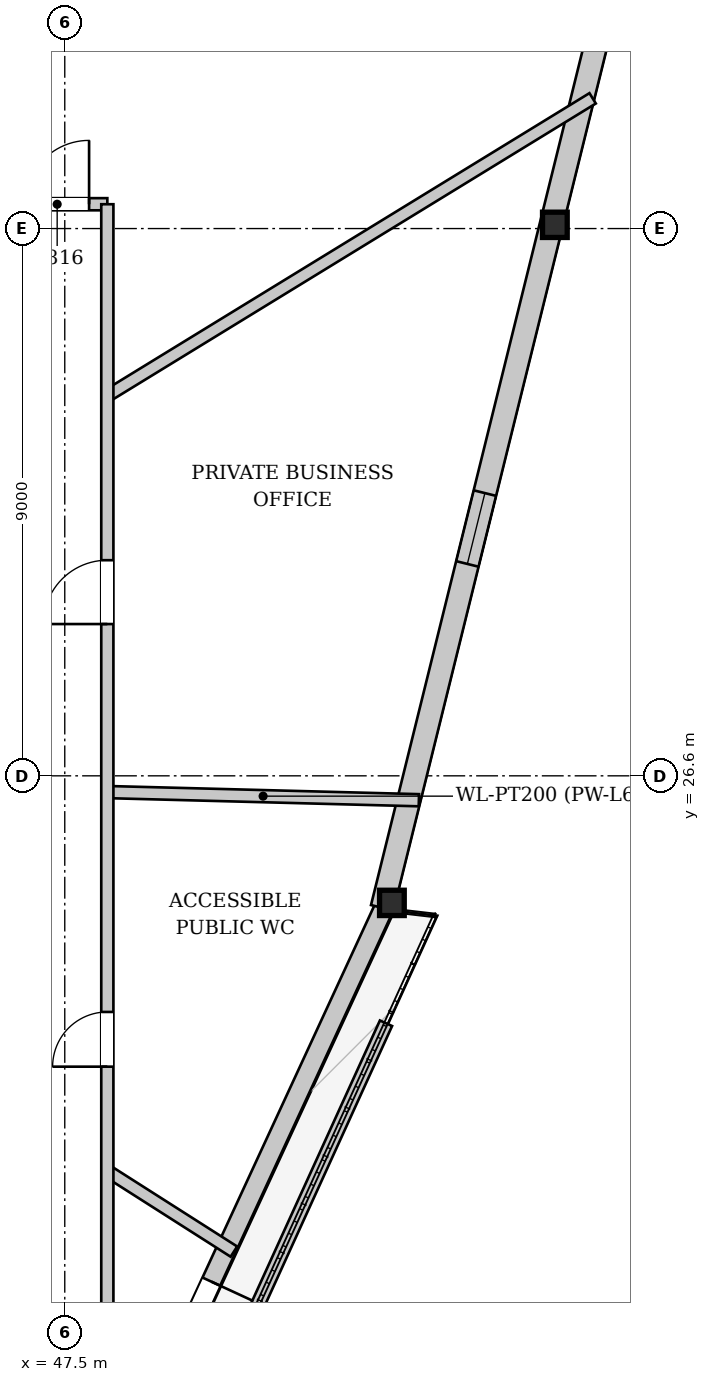
"""IFC4 building model, lengths in metres.
Left out: names, types, materials, properties, quantities, classifications, styles, units other than length and angle.
Written with IfcOpenShell. Run it as: python <this file> out.ifc"""

import sys

from ifc_helpers import new_model, si_unit, direction, frame, frame_2d, origin, origin_2d, place, context, subcontext, project, spatial, rectangle, i_section, extrude, source, transform, mapped, element, fill, save


model = new_model("IFC4")
c1 = context("Model", 3, precision=1e-05, world=origin(), true_north=direction((0.0, 1.0)))
c2 = subcontext(c1, "Body", "Model", "MODEL_VIEW")
j1 = project(units=[si_unit("LENGTHUNIT", "METRE"), si_unit("PLANEANGLEUNIT", "RADIAN")], contexts=[c1])
p1 = place(None, origin())
s1 = spatial("IfcSite", under=j1, at=p1, CompositionType="ELEMENT")
p2 = place(p1, origin())
s2 = spatial("IfcBuilding", under=s1, at=p2, CompositionType="ELEMENT")
p3 = place(p2, frame((0.0, 0.0, 227.35)))
s3 = spatial("IfcBuildingStorey", under=s2, at=p3, CompositionType="ELEMENT", Elevation=227.35)
m1 = source(origin(), c2, "Body", "SweptSolid", [
    extrude(i_section(OverallWidth=0.406, OverallDepth=0.416, WebThickness=0.027, FlangeThickness=0.042, at=origin_2d()), origin(), (0.0, 0.0, 1.0), 3.395),
])
p4 = place(p3, frame((52.905, 24.384, 0.0), z_axis=(-0.014886205973, 0.074790600059, 0.997088144055), x_axis=(-0.980761610282, -0.195209282047, 0.0)))
e1 = element("IfcColumn", 1, at=p4, inside=s3, PredefinedType="COLUMN", context=c2, shape_type="MappedRepresentation", body=[
    mapped(m1, transform((0.0, 0.0, 0.0), x_axis=(1.0, 0.0, 0.0), y_axis=(0.0, 1.0, 0.0), z_axis=(0.0, 0.0, 1.0), scale=1.0)),
])
m2 = source(origin(), c2, "Body", "SweptSolid", [
    extrude(i_section(OverallWidth=0.406, OverallDepth=0.416, WebThickness=0.027, FlangeThickness=0.042, at=origin_2d()), origin(), (0.0, 0.0, 1.0), 3.402),
])
p5 = place(p3, frame((55.663, 35.523, 0.0), z_axis=(-0.060488685139, 0.081082104635, 0.994870248464), x_axis=(-0.80152951898, -0.597955207522, 0.0)))
e2 = element("IfcColumn", 2, at=p5, inside=s3, PredefinedType="COLUMN", context=c2, shape_type="MappedRepresentation", body=[
    mapped(m2, transform((0.0, 0.0, 0.0), x_axis=(1.0, 0.0, 0.0), y_axis=(0.0, 1.0, 0.0), z_axis=(0.0, 0.0, 1.0), scale=1.0)),
])
p6 = place(p3, frame((52.76, 24.451, 0.0), z_axis=(0.0, 0.0, 1.0), x_axis=(-0.419378553641, -0.907811449997, 0.0)))
e3 = element("IfcWall", 3, at=p6, inside=s3, PredefinedType="SOLIDWALL", context=c2, shape_type="SweptSolid", body=[
    extrude(rectangle(XDim=22.952, YDim=0.32, at=frame_2d((11.476, 0.0))), origin(), (0.0, 0.0, 1.0), 2.822),
])
p7 = place(p6, frame((6.795, 0.0, 0.0)))
e4 = element("IfcOpeningElement", 4, at=p7, cuts=e3, PredefinedType="OPENING", context=c2, shape_type="SweptSolid", body=[
    extrude(rectangle(XDim=1.5, YDim=2.3, at=frame_2d((0.75, 1.15))), frame((0.0, 0.17, 0.0), z_axis=(0.0, -1.0, 0.0), x_axis=(1.0, 0.0, 0.0)), (0.0, 0.0, 1.0), 0.34),
])
p8 = place(p6, frame((17.285, 0.0, 0.352)))
e5 = element("IfcOpeningElement", 5, at=p8, cuts=e3, PredefinedType="OPENING", context=c2, shape_type="SweptSolid", body=[
    extrude(rectangle(XDim=2.6, YDim=2.35, at=frame_2d((1.3, 1.175))), frame((0.0, 0.17, 0.0), z_axis=(0.0, -1.0, 0.0), x_axis=(1.0, 0.0, 0.0)), (0.0, 0.0, 1.0), 0.34),
])
p9 = place(p3, frame((58.237, 46.709, 0.0), z_axis=(0.0, 0.0, 1.0), x_axis=(-0.240317528697, -0.9706943316, 0.0)))
e6 = element("IfcWall", 6, at=p9, inside=s3, PredefinedType="SOLIDWALL", context=c2, shape_type="SweptSolid", body=[
    extrude(rectangle(XDim=22.952, YDim=0.38, at=frame_2d((11.476, 0.0))), origin(), (0.0, 0.0, 1.0), 2.822),
])
p10 = place(p9, frame((5.827, 0.0, 0.65)))
e7 = element("IfcOpeningElement", 7, at=p10, cuts=e6, PredefinedType="OPENING", context=c2, shape_type="SweptSolid", body=[
    extrude(rectangle(XDim=1.2, YDim=1.5, at=frame_2d((0.6, 0.75))), frame((0.0, 0.2, 0.0), z_axis=(0.0, -1.0, 0.0), x_axis=(1.0, 0.0, 0.0)), (0.0, 0.0, 1.0), 0.4),
])
p11 = place(p9, frame((15.926, 0.0, 0.65)))
e8 = element("IfcOpeningElement", 8, at=p11, cuts=e6, PredefinedType="OPENING", context=c2, shape_type="SweptSolid", body=[
    extrude(rectangle(XDim=1.2, YDim=1.5, at=frame_2d((0.6, 0.75))), frame((0.0, 0.2, 0.0), z_axis=(0.0, -1.0, 0.0), x_axis=(1.0, 0.0, 0.0)), (0.0, 0.0, 1.0), 0.4),
])
p12 = place(p3, frame((44.308, 3.919, 0.0), z_axis=(0.0, 0.0, 1.0), x_axis=(0.41441444949, 0.910088272671, 0.0)))
e9 = element("IfcWall", 9, at=p12, inside=s3, PredefinedType="PARAPET", context=c2, shape_type="SweptSolid", body=[
    extrude(rectangle(XDim=20.451, YDim=0.22, at=frame_2d((10.226, 0.0))), origin(), (0.0, 0.0, 1.0), 0.3),
])
p13 = place(p3, frame((48.2, 26.333, 0.0), z_axis=(0.0, 0.0, 1.0), x_axis=(0.999656781233, -0.026197704754, 0.0)))
e10 = element("IfcWall", 10, at=p13, inside=s3, PredefinedType="PARTITIONING", context=c2, shape_type="SweptSolid", body=[
    extrude(rectangle(XDim=5.125, YDim=0.2, at=frame_2d((2.563, 0.0))), origin(), (0.0, 0.0, 1.0), 3.33),
])
p14 = place(p3, frame((48.2, 32.851, 0.0), z_axis=(0.0, 0.0, 1.0), x_axis=(0.852636485322, 0.522504568303, 0.0)))
e11 = element("IfcWall", 11, at=p14, inside=s3, PredefinedType="PARTITIONING", context=c2, shape_type="SweptSolid", body=[
    extrude(rectangle(XDim=9.361, YDim=0.2, at=frame_2d((4.68, 0.0))), origin(), (0.0, 0.0, 1.0), 3.33),
])
p15 = place(p3, frame((48.2, 20.102, 0.0), z_axis=(0.0, 0.0, 1.0), x_axis=(0.843376251706, -0.537323457573, 0.0)))
e12 = element("IfcWall", 12, at=p15, inside=s3, PredefinedType="PARTITIONING", context=c2, shape_type="SweptSolid", body=[
    extrude(rectangle(XDim=2.468, YDim=0.2, at=frame_2d((1.234, 0.0))), origin(), (0.0, 0.0, 1.0), 3.33),
])
p16 = place(p3, frame((43.4, 36.0, 0.0), z_axis=(0.0, 0.0, 1.0), x_axis=(1.0, 0.0, 0.0)))
e13 = element("IfcWall", 13, at=p16, inside=s3, PredefinedType="PARTITIONING", context=c2, shape_type="SweptSolid", body=[
    extrude(rectangle(XDim=4.8, YDim=0.2, at=frame_2d((2.4, 0.0))), origin(), (0.0, 0.0, 1.0), 3.33),
])
p17 = place(p16, frame((3.45, 0.0, 0.0)))
e14 = element("IfcOpeningElement", 14, at=p17, cuts=e13, PredefinedType="OPENING", context=c2, shape_type="SweptSolid", body=[
    extrude(rectangle(XDim=1.05, YDim=2.2, at=frame_2d((0.525, 1.1))), frame((0.0, 0.11, 0.0), z_axis=(0.0, -1.0, 0.0), x_axis=(1.0, 0.0, 0.0)), (0.0, 0.0, 1.0), 0.22),
])
p18 = place(p3, frame((48.2, 17.2, 0.0), z_axis=(0.0, 0.0, 1.0), x_axis=(0.0, 1.0, 0.0)))
e15 = element("IfcWall", 15, at=p18, inside=s3, PredefinedType="PARTITIONING", context=c2, shape_type="SweptSolid", body=[
    extrude(rectangle(XDim=18.8, YDim=0.2, at=frame_2d((9.4, 0.0))), origin(), (0.0, 0.0, 1.0), 3.075),
])
p19 = place(p18, frame((11.896, 0.0, 0.0)))
e16 = element("IfcOpeningElement", 16, at=p19, cuts=e15, PredefinedType="OPENING", context=c2, shape_type="SweptSolid", body=[
    extrude(rectangle(XDim=1.05, YDim=2.2, at=frame_2d((0.525, 1.1))), frame((0.0, 0.11, 0.0), z_axis=(0.0, -1.0, 0.0), x_axis=(1.0, 0.0, 0.0)), (0.0, 0.0, 1.0), 0.22),
])
p20 = place(p18, frame((4.617, 0.0, 0.0)))
e17 = element("IfcOpeningElement", 17, at=p20, cuts=e15, PredefinedType="OPENING", context=c2, shape_type="SweptSolid", body=[
    extrude(rectangle(XDim=0.9, YDim=2.1, at=frame_2d((0.45, 1.05))), frame((0.0, 0.11, 0.0), z_axis=(0.0, -1.0, 0.0), x_axis=(1.0, 0.0, 0.0)), (0.0, 0.0, 1.0), 0.22),
])
m3 = source(origin(), c2, "Body", "SweptSolid", [
    extrude(rectangle(XDim=1.5, YDim=2.3, at=frame_2d((0.75, 1.15))), frame((0.0, 0.025, 0.0), z_axis=(0.0, -1.0, 0.0), x_axis=(1.0, 0.0, 0.0)), (0.0, 0.0, 1.0), 0.05),
])
p21 = place(p7, origin())
e18 = element("IfcDoor", 18, at=p21, inside=s3, OperationType="DOUBLE_DOOR_SINGLE_SWING", PredefinedType="DOOR", context=c2, shape_type="MappedRepresentation", body=[
    mapped(m3, transform((0.0, 0.0, 0.0), x_axis=(1.0, 0.0, 0.0), y_axis=(0.0, 1.0, 0.0), z_axis=(0.0, 0.0, 1.0), scale=1.0)),
])
fill(e4, e18)
m4 = source(origin(), c2, "Body", "SweptSolid", [
    extrude(rectangle(XDim=1.2, YDim=1.5, at=frame_2d((0.6, 0.75))), frame((0.0, 0.03, 0.0), z_axis=(0.0, -1.0, 0.0), x_axis=(1.0, 0.0, 0.0)), (0.0, 0.0, 1.0), 0.06),
])
p22 = place(p11, origin())
e19 = element("IfcWindow", 19, at=p22, inside=s3, PartitioningType="SINGLE_PANEL", PredefinedType="WINDOW", context=c2, shape_type="MappedRepresentation", body=[
    mapped(m4, transform((0.0, 0.0, 0.0), x_axis=(1.0, 0.0, 0.0), y_axis=(0.0, 1.0, 0.0), z_axis=(0.0, 0.0, 1.0), scale=1.0)),
])
fill(e8, e19)
m5 = source(origin(), c2, "Body", "SweptSolid", [
    extrude(rectangle(XDim=1.05, YDim=2.2, at=frame_2d((0.525, 1.1))), frame((0.0, 0.025, 0.0), z_axis=(0.0, -1.0, 0.0), x_axis=(1.0, 0.0, 0.0)), (0.0, 0.0, 1.0), 0.05),
])
p23 = place(p17, origin())
e20 = element("IfcDoor", 20, at=p23, inside=s3, OperationType="SINGLE_SWING_RIGHT", PredefinedType="DOOR", context=c2, shape_type="MappedRepresentation", body=[
    mapped(m5, transform((0.0, 0.0, 0.0), x_axis=(1.0, 0.0, 0.0), y_axis=(0.0, 1.0, 0.0), z_axis=(0.0, 0.0, 1.0), scale=1.0)),
])
fill(e14, e20)
p24 = place(p19, origin())
e21 = element("IfcDoor", 21, at=p24, inside=s3, OperationType="SINGLE_SWING_LEFT", PredefinedType="DOOR", context=c2, shape_type="MappedRepresentation", body=[
    mapped(m5, transform((0.0, 0.0, 0.0), x_axis=(1.0, 0.0, 0.0), y_axis=(0.0, 1.0, 0.0), z_axis=(0.0, 0.0, 1.0), scale=1.0)),
])
fill(e16, e21)
m6 = source(origin(), c2, "Body", "SweptSolid", [
    extrude(rectangle(XDim=0.9, YDim=2.1, at=frame_2d((0.45, 1.05))), frame((0.0, 0.025, 0.0), z_axis=(0.0, -1.0, 0.0), x_axis=(1.0, 0.0, 0.0)), (0.0, 0.0, 1.0), 0.05),
])
p25 = place(p20, origin())
e22 = element("IfcDoor", 22, at=p25, inside=s3, OperationType="SINGLE_SWING_LEFT", PredefinedType="DOOR", context=c2, shape_type="MappedRepresentation", body=[
    mapped(m6, transform((0.0, 0.0, 0.0), x_axis=(1.0, 0.0, 0.0), y_axis=(0.0, 1.0, 0.0), z_axis=(0.0, 0.0, 1.0), scale=1.0)),
])
fill(e17, e22)
save(model, sys.argv[1])
